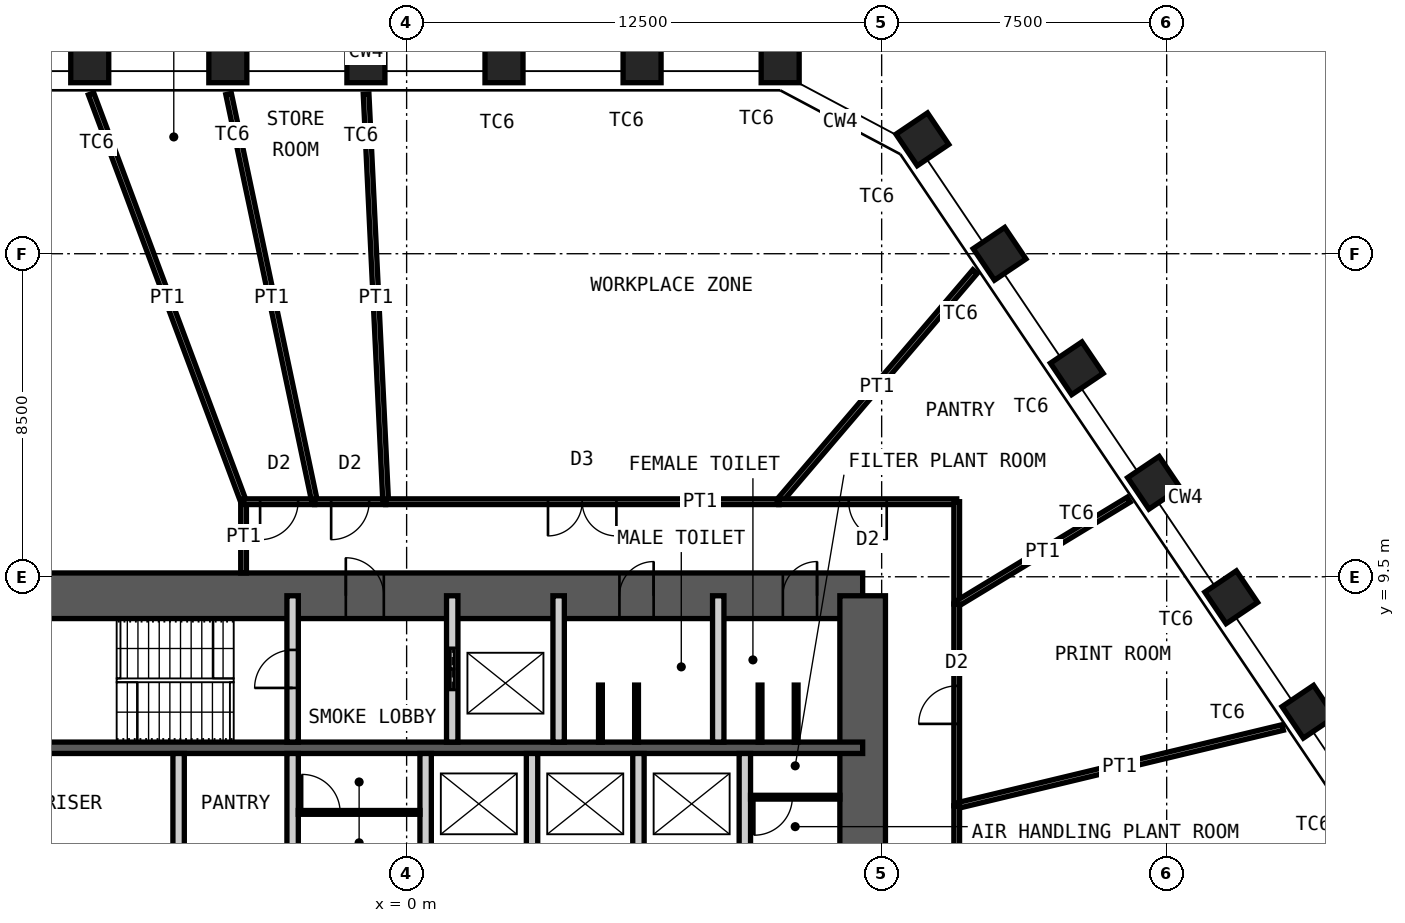
"""IFC4 building model, lengths in metres.
Left out: names, types, materials, properties, quantities, classifications, styles, units other than length and angle.
Written with IfcOpenShell. Run it as: python <this file> out.ifc"""

import sys

from ifc_helpers import new_model, si_unit, direction, frame, frame_2d, origin, origin_2d, place, context, subcontext, project, spatial, rectangle, hollow_rectangle, extrude, element, fill, save


model = new_model("IFC4")
c1 = context("Model", 3, precision=1e-05, world=origin(), true_north=direction((0.0, 1.0)))
c2 = subcontext(c1, "Body", "Model", "MODEL_VIEW")
j1 = project(units=[si_unit("LENGTHUNIT", "METRE"), si_unit("PLANEANGLEUNIT", "RADIAN")], contexts=[c1])
p1 = place(None, origin())
s1 = spatial("IfcSite", under=j1, at=p1, CompositionType="ELEMENT")
p2 = place(p1, origin())
s2 = spatial("IfcBuilding", under=s1, at=p2, CompositionType="ELEMENT")
p3 = place(p2, frame((0.0, 0.0, 235.0)))
s3 = spatial("IfcBuildingStorey", under=s2, at=p3, CompositionType="ELEMENT", Elevation=235.0)
for number, where, z_axis, x_axis in (
    (1, (-8.338, 23.0, 0.0), (0.0, 0.0, 1.0), (-1.0, 0.0, 0.0)),
    (2, (-4.705, 23.0, 0.0), (0.0, 0.0, 1.0), (-1.0, 0.0, 0.0)),
    (3, (-1.071, 23.0, 0.0), (0.0, 0.0, 1.0), (-1.0, 0.0, 0.0)),
    (4, (2.562, 23.0, 0.0), (0.0, 0.0, 1.0), (-1.0, 0.0, 0.0)),
    (5, (6.196, 23.0, 0.0), (0.0, 0.0, 1.0), (-1.0, 0.0, 0.0)),
    (6, (9.829, 23.0, 0.0), (0.0, 0.0, 1.0), (-1.0, 0.0, 0.0)),
    (7, (13.571, 21.01, 0.0), (0.0, 0.0, 1.0), (-0.559, 0.829, 0.0)),
    (8, (15.603, 17.998, 0.0), (0.0, 0.0, 1.0), (-0.559, 0.829, 0.0)),
    (9, (17.635, 14.986, 0.0), (0.0, 0.0, 1.0), (-0.559, 0.829, 0.0)),
    (10, (19.667, 11.973, 0.0), (0.0, 0.0, 1.0), (-0.559, 0.829, 0.0)),
    (11, (21.699, 8.961, 0.0), (0.0, 0.0, 1.0), (-0.559, 0.829, 0.0)),
    (12, (23.731, 5.948, 0.0), (0.0, 0.0, 1.0), (-0.559, 0.829, 0.0)),
):
    element("IfcColumn", number, at=place(p3, frame(where, z_axis=z_axis, x_axis=x_axis)), inside=s3, PredefinedType="COLUMN", context=c2, shape_type="SweptSolid", body=[
        extrude(hollow_rectangle(XDim=1.0, YDim=1.0, WallThickness=0.06, at=origin_2d()), origin(), (0.0, 0.0, 1.0), 4.2),
    ])
p4 = place(p3, frame((-12.0, 9.0, 0.0), z_axis=(0.0, 0.0, 1.0), x_axis=(1.0, 0.0, 0.0)))
e13 = element("IfcWall", 13, at=p4, inside=s3, PredefinedType="SHEAR", context=c2, shape_type="SweptSolid", body=[
    extrude(rectangle(XDim=24.0, YDim=1.2, at=frame_2d((12.0, 0.0))), origin(), (0.0, 0.0, 1.0), 4.2),
])
p5 = place(p4, frame((10.4, 0.0, 0.0)))
e14 = element("IfcOpeningElement", 14, at=p5, cuts=e13, PredefinedType="OPENING", context=c2, shape_type="SweptSolid", body=[
    extrude(rectangle(XDim=1.0, YDim=2.1, at=frame_2d((0.5, 1.05))), frame((0.0, 0.61, 0.0), z_axis=(0.0, -1.0, 0.0), x_axis=(1.0, 0.0, 0.0)), (0.0, 0.0, 1.0), 1.22),
])
p6 = place(p4, frame((17.6, 0.0, 0.0)))
e15 = element("IfcOpeningElement", 15, at=p6, cuts=e13, PredefinedType="OPENING", context=c2, shape_type="SweptSolid", body=[
    extrude(rectangle(XDim=0.9, YDim=2.1, at=frame_2d((0.45, 1.05))), frame((0.0, 0.61, 0.0), z_axis=(0.0, -1.0, 0.0), x_axis=(1.0, 0.0, 0.0)), (0.0, 0.0, 1.0), 1.22),
])
p7 = place(p4, frame((21.9, 0.0, 0.0)))
e16 = element("IfcOpeningElement", 16, at=p7, cuts=e13, PredefinedType="OPENING", context=c2, shape_type="SweptSolid", body=[
    extrude(rectangle(XDim=0.9, YDim=2.1, at=frame_2d((0.45, 1.05))), frame((0.0, 0.61, 0.0), z_axis=(0.0, -1.0, 0.0), x_axis=(1.0, 0.0, 0.0)), (0.0, 0.0, 1.0), 1.22),
])
p8 = place(p3, frame((12.0, -9.0, 0.0), z_axis=(0.0, 0.0, 1.0), x_axis=(0.0, 1.0, 0.0)))
e17 = element("IfcWall", 17, at=p8, inside=s3, PredefinedType="SHEAR", context=c2, shape_type="SweptSolid", body=[
    extrude(rectangle(XDim=18.0, YDim=1.2, at=frame_2d((9.0, 0.0))), origin(), (0.0, 0.0, 1.0), 4.2),
])
p9 = place(p8, frame((8.1, 0.0, 0.0)))
e18 = element("IfcOpeningElement", 18, at=p9, cuts=e17, PredefinedType="OPENING", context=c2, shape_type="SweptSolid", body=[
    extrude(rectangle(XDim=1.8, YDim=2.1, at=frame_2d((0.9, 1.05))), frame((0.0, 0.61, 0.0), z_axis=(0.0, -1.0, 0.0), x_axis=(1.0, 0.0, 0.0)), (0.0, 0.0, 1.0), 1.22),
])
p10 = place(p3, frame((-12.0, 5.0, 0.0), z_axis=(0.0, 0.0, 1.0), x_axis=(1.0, 0.0, 0.0)))
e19 = element("IfcWall", 19, at=p10, inside=s3, PredefinedType="SHEAR", context=c2, shape_type="SweptSolid", body=[
    extrude(rectangle(XDim=24.0, YDim=0.3, at=frame_2d((12.0, 0.0))), origin(), (0.0, 0.0, 1.0), 4.2),
])
p11 = place(p3, frame((-3.0, 5.15, 0.0), z_axis=(0.0, 0.0, 1.0), x_axis=(0.0, 1.0, 0.0)))
e20 = element("IfcWall", 20, at=p11, inside=s3, PredefinedType="PARTITIONING", context=c2, shape_type="SweptSolid", body=[
    extrude(rectangle(XDim=3.85, YDim=0.3, at=frame_2d((1.925, 0.0))), origin(), (0.0, 0.0, 1.0), 3.98),
])
p12 = place(p11, frame((1.425, 0.0, 0.0)))
e21 = element("IfcOpeningElement", 21, at=p12, cuts=e20, PredefinedType="OPENING", context=c2, shape_type="SweptSolid", body=[
    extrude(rectangle(XDim=1.0, YDim=2.1, at=frame_2d((0.5, 1.05))), frame((0.0, 0.16, 0.0), z_axis=(0.0, -1.0, 0.0), x_axis=(1.0, 0.0, 0.0)), (0.0, 0.0, 1.0), 0.32),
])
p13 = place(p3, frame((1.2, 5.15, 0.0), z_axis=(0.0, 0.0, 1.0), x_axis=(0.0, 1.0, 0.0)))
e22 = element("IfcWall", 22, at=p13, inside=s3, PredefinedType="PARTITIONING", context=c2, shape_type="SweptSolid", body=[
    extrude(rectangle(XDim=3.85, YDim=0.3, at=frame_2d((1.925, 0.0))), origin(), (0.0, 0.0, 1.0), 3.98),
])
p14 = place(p13, frame((1.375, 0.0, 0.0)))
e23 = element("IfcOpeningElement", 23, at=p14, cuts=e22, PredefinedType="OPENING", context=c2, shape_type="SweptSolid", body=[
    extrude(rectangle(XDim=1.1, YDim=2.4, at=frame_2d((0.55, 1.2))), frame((0.0, 0.16, 0.0), z_axis=(0.0, -1.0, 0.0), x_axis=(1.0, 0.0, 0.0)), (0.0, 0.0, 1.0), 0.32),
])
for number, where, z_axis, x_axis in (
    (24, (4.0, 5.15, 0.0), (0.0, 0.0, 1.0), (0.0, 1.0, 0.0)),
    (25, (8.2, 5.15, 0.0), (0.0, 0.0, 1.0), (0.0, 1.0, 0.0)),
):
    element("IfcWall", number, at=place(p3, frame(where, z_axis=z_axis, x_axis=x_axis)), inside=s3, PredefinedType="PARTITIONING", context=c2, shape_type="SweptSolid", body=[
        extrude(rectangle(XDim=3.85, YDim=0.3, at=frame_2d((1.925, 0.0))), origin(), (0.0, 0.0, 1.0), 3.98),
    ])
for number, where, z_axis, x_axis in (
    (26, (-6.0, 2.2, 0.0), (0.0, 0.0, 1.0), (0.0, 1.0, 0.0)),
    (27, (-3.0, 2.2, 0.0), (0.0, 0.0, 1.0), (0.0, 1.0, 0.0)),
    (28, (0.5, 2.2, 0.0), (0.0, 0.0, 1.0), (0.0, 1.0, 0.0)),
    (29, (3.3, 2.2, 0.0), (0.0, 0.0, 1.0), (0.0, 1.0, 0.0)),
    (30, (6.1, 2.2, 0.0), (0.0, 0.0, 1.0), (0.0, 1.0, 0.0)),
    (31, (8.9, 2.2, 0.0), (0.0, 0.0, 1.0), (0.0, 1.0, 0.0)),
):
    element("IfcWall", number, at=place(p3, frame(where, z_axis=z_axis, x_axis=x_axis)), inside=s3, PredefinedType="PARTITIONING", context=c2, shape_type="SweptSolid", body=[
        extrude(rectangle(XDim=2.65, YDim=0.3, at=frame_2d((1.325, 0.0))), origin(), (0.0, 0.0, 1.0), 3.98),
    ])
p15 = place(p3, frame((-2.85, 3.3, 0.0), z_axis=(0.0, 0.0, 1.0), x_axis=(1.0, 0.0, 0.0)))
e32 = element("IfcWall", 32, at=p15, inside=s3, PredefinedType="PARTITIONING", context=c2, shape_type="SweptSolid", body=[
    extrude(rectangle(XDim=3.2, YDim=0.1, at=frame_2d((1.6, 0.0))), origin(), (0.0, 0.0, 1.0), 3.98),
])
p16 = place(p15, frame((0.1, 0.0, 0.0)))
e33 = element("IfcOpeningElement", 33, at=p16, cuts=e32, PredefinedType="OPENING", context=c2, shape_type="SweptSolid", body=[
    extrude(rectangle(XDim=1.0, YDim=2.4, at=frame_2d((0.5, 1.2))), frame((0.0, 0.06, 0.0), z_axis=(0.0, -1.0, 0.0), x_axis=(1.0, 0.0, 0.0)), (0.0, 0.0, 1.0), 0.12),
])
p17 = place(p3, frame((9.05, 3.7, 0.0), z_axis=(0.0, 0.0, 1.0), x_axis=(1.0, 0.0, 0.0)))
e34 = element("IfcWall", 34, at=p17, inside=s3, PredefinedType="PARTITIONING", context=c2, shape_type="SweptSolid", body=[
    extrude(rectangle(XDim=2.35, YDim=0.1, at=frame_2d((1.175, 0.0))), origin(), (0.0, 0.0, 1.0), 3.98),
])
p18 = place(p17, frame((0.1, 0.0, 0.0)))
e35 = element("IfcOpeningElement", 35, at=p18, cuts=e34, PredefinedType="OPENING", context=c2, shape_type="SweptSolid", body=[
    extrude(rectangle(XDim=1.0, YDim=2.4, at=frame_2d((0.5, 1.2))), frame((0.0, 0.06, 0.0), z_axis=(0.0, -1.0, 0.0), x_axis=(1.0, 0.0, 0.0)), (0.0, 0.0, 1.0), 0.12),
])
for number, where, z_axis, x_axis in (
    (36, (5.1, 5.15, 0.0), (0.0, 0.0, 1.0), (0.0, 1.0, 0.0)),
    (37, (6.05, 5.15, 0.0), (0.0, 0.0, 1.0), (0.0, 1.0, 0.0)),
    (38, (9.3, 5.15, 0.0), (0.0, 0.0, 1.0), (0.0, 1.0, 0.0)),
    (39, (10.25, 5.15, 0.0), (0.0, 0.0, 1.0), (0.0, 1.0, 0.0)),
):
    element("IfcWall", number, at=place(p3, frame(where, z_axis=z_axis, x_axis=x_axis)), inside=s3, PredefinedType="PARTITIONING", context=c2, shape_type="SweptSolid", body=[
        extrude(rectangle(XDim=1.5, YDim=0.1, at=frame_2d((0.75, 0.0))), origin(), (0.0, 0.0, 1.0), 2.1),
    ])
p19 = place(p3, frame((-4.291, 9.6, 0.0), z_axis=(0.0, 0.0, 1.0), x_axis=(0.0, 1.0, 0.0)))
e40 = element("IfcWall", 40, at=p19, inside=s3, PredefinedType="PARTITIONING", context=c2, shape_type="SweptSolid", body=[
    extrude(rectangle(XDim=1.875, YDim=0.15, at=frame_2d((0.938, 0.0))), origin(), (0.0, 0.0, 1.0), 4.03),
])
p20 = place(p3, frame((-8.303, 22.206, 0.0), z_axis=(0.0, 0.0, 1.0), x_axis=(0.350242883069, -0.936658914899, 0.0)))
e41 = element("IfcWall", 41, at=p20, inside=s3, PredefinedType="PARTITIONING", context=c2, shape_type="SweptSolid", body=[
    extrude(rectangle(XDim=11.457, YDim=0.15, at=frame_2d((5.729, 0.0))), origin(), (0.0, 0.0, 1.0), 3.43),
])
p21 = place(p3, frame((-4.291, 11.475, 0.0), z_axis=(0.0, 0.0, 1.0), x_axis=(1.0, 0.0, 0.0)))
e42 = element("IfcWall", 42, at=p21, inside=s3, PredefinedType="PARTITIONING", context=c2, shape_type="SweptSolid", body=[
    extrude(rectangle(XDim=1.87, YDim=0.15, at=frame_2d((0.935, 0.0))), origin(), (0.0, 0.0, 1.0), 4.03),
])
p22 = place(p21, frame((0.435, 0.0, 0.0)))
e43 = element("IfcOpeningElement", 43, at=p22, cuts=e42, PredefinedType="OPENING", context=c2, shape_type="SweptSolid", body=[
    extrude(rectangle(XDim=1.0, YDim=2.4, at=frame_2d((0.5, 1.2))), frame((0.0, 0.085, 0.0), z_axis=(0.0, -1.0, 0.0), x_axis=(1.0, 0.0, 0.0)), (0.0, 0.0, 1.0), 0.17),
])
p23 = place(p3, frame((-4.684, 22.202, 0.0), z_axis=(0.0, 0.0, 1.0), x_axis=(0.206456017157, -0.978455881979, 0.0)))
e44 = element("IfcWall", 44, at=p23, inside=s3, PredefinedType="PARTITIONING", context=c2, shape_type="SweptSolid", body=[
    extrude(rectangle(XDim=10.963, YDim=0.15, at=frame_2d((5.481, 0.0))), origin(), (0.0, 0.0, 1.0), 3.43),
])
p24 = place(p3, frame((-2.421, 11.475, 0.0), z_axis=(0.0, 0.0, 1.0), x_axis=(1.0, 0.0, 0.0)))
e45 = element("IfcWall", 45, at=p24, inside=s3, PredefinedType="PARTITIONING", context=c2, shape_type="SweptSolid", body=[
    extrude(rectangle(XDim=1.87, YDim=0.15, at=frame_2d((0.935, 0.0))), origin(), (0.0, 0.0, 1.0), 4.03),
])
p25 = place(p24, frame((0.435, 0.0, 0.0)))
e46 = element("IfcOpeningElement", 46, at=p25, cuts=e45, PredefinedType="OPENING", context=c2, shape_type="SweptSolid", body=[
    extrude(rectangle(XDim=1.0, YDim=2.4, at=frame_2d((0.5, 1.2))), frame((0.0, 0.085, 0.0), z_axis=(0.0, -1.0, 0.0), x_axis=(1.0, 0.0, 0.0)), (0.0, 0.0, 1.0), 0.17),
])
p26 = place(p3, frame((-1.067, 22.2, 0.0), z_axis=(0.0, 0.0, 1.0), x_axis=(0.047998335863, -0.998847415652, 0.0)))
e47 = element("IfcWall", 47, at=p26, inside=s3, PredefinedType="PARTITIONING", context=c2, shape_type="SweptSolid", body=[
    extrude(rectangle(XDim=10.738, YDim=0.15, at=frame_2d((5.369, 0.0))), origin(), (0.0, 0.0, 1.0), 3.43),
])
p27 = place(p3, frame((-0.551, 11.475, 0.0), z_axis=(0.0, 0.0, 1.0), x_axis=(1.0, 0.0, 0.0)))
e48 = element("IfcWall", 48, at=p27, inside=s3, PredefinedType="PARTITIONING", context=c2, shape_type="SweptSolid", body=[
    extrude(rectangle(XDim=10.342, YDim=0.15, at=frame_2d((5.171, 0.0))), origin(), (0.0, 0.0, 1.0), 4.03),
])
p28 = place(p27, frame((4.271, 0.0, 0.0)))
e49 = element("IfcOpeningElement", 49, at=p28, cuts=e48, PredefinedType="OPENING", context=c2, shape_type="SweptSolid", body=[
    extrude(rectangle(XDim=1.8, YDim=2.4, at=frame_2d((0.9, 1.2))), frame((0.0, 0.085, 0.0), z_axis=(0.0, -1.0, 0.0), x_axis=(1.0, 0.0, 0.0)), (0.0, 0.0, 1.0), 0.17),
])
p29 = place(p3, frame((14.958, 17.531, 0.0), z_axis=(0.0, 0.0, 1.0), x_axis=(-0.649097500837, -0.760705221756, 0.0)))
e50 = element("IfcWall", 50, at=p29, inside=s3, PredefinedType="PARTITIONING", context=c2, shape_type="SweptSolid", body=[
    extrude(rectangle(XDim=7.96, YDim=0.15, at=frame_2d((3.98, 0.0))), origin(), (0.0, 0.0, 1.0), 3.43),
])
p30 = place(p3, frame((9.791, 11.475, 0.0), z_axis=(0.0, 0.0, 1.0), x_axis=(1.0, 0.0, 0.0)))
e51 = element("IfcWall", 51, at=p30, inside=s3, PredefinedType="PARTITIONING", context=c2, shape_type="SweptSolid", body=[
    extrude(rectangle(XDim=4.684, YDim=0.15, at=frame_2d((2.342, 0.0))), origin(), (0.0, 0.0, 1.0), 4.03),
])
p31 = place(p30, frame((1.842, 0.0, 0.0)))
e52 = element("IfcOpeningElement", 52, at=p31, cuts=e51, PredefinedType="OPENING", context=c2, shape_type="SweptSolid", body=[
    extrude(rectangle(XDim=1.0, YDim=2.4, at=frame_2d((0.5, 1.2))), frame((0.0, 0.085, 0.0), z_axis=(0.0, -1.0, 0.0), x_axis=(1.0, 0.0, 0.0)), (0.0, 0.0, 1.0), 0.17),
])
p32 = place(p3, frame((14.475, 11.475, 0.0), z_axis=(0.0, 0.0, 1.0), x_axis=(0.0, -1.0, 0.0)))
e53 = element("IfcWall", 53, at=p32, inside=s3, PredefinedType="PARTITIONING", context=c2, shape_type="SweptSolid", body=[
    extrude(rectangle(XDim=2.692, YDim=0.15, at=frame_2d((1.346, 0.0))), origin(), (0.0, 0.0, 1.0), 4.03),
])
p33 = place(p3, frame((19.001, 11.53, 0.0), z_axis=(0.0, 0.0, 1.0), x_axis=(-0.854906581035, -0.518781975114, 0.0)))
e54 = element("IfcWall", 54, at=p33, inside=s3, PredefinedType="PARTITIONING", context=c2, shape_type="SweptSolid", body=[
    extrude(rectangle(XDim=5.294, YDim=0.15, at=frame_2d((2.647, 0.0))), origin(), (0.0, 0.0, 1.0), 3.43),
])
p34 = place(p3, frame((14.475, 8.783, 0.0), z_axis=(0.0, 0.0, 1.0), x_axis=(0.0, -1.0, 0.0)))
e55 = element("IfcWall", 55, at=p34, inside=s3, PredefinedType="PARTITIONING", context=c2, shape_type="SweptSolid", body=[
    extrude(rectangle(XDim=5.309, YDim=0.15, at=frame_2d((2.654, 0.0))), origin(), (0.0, 0.0, 1.0), 4.03),
])
p35 = place(p34, frame((2.154, 0.0, 0.0)))
e56 = element("IfcOpeningElement", 56, at=p35, cuts=e55, PredefinedType="OPENING", context=c2, shape_type="SweptSolid", body=[
    extrude(rectangle(XDim=1.0, YDim=2.4, at=frame_2d((0.5, 1.2))), frame((0.0, 0.085, 0.0), z_axis=(0.0, -1.0, 0.0), x_axis=(1.0, 0.0, 0.0)), (0.0, 0.0, 1.0), 0.17),
])
p36 = place(p3, frame((23.053, 5.534, 0.0), z_axis=(0.0, 0.0, 1.0), x_axis=(-0.972377252501, -0.233414821335, 0.0)))
e57 = element("IfcWall", 57, at=p36, inside=s3, PredefinedType="PARTITIONING", context=c2, shape_type="SweptSolid", body=[
    extrude(rectangle(XDim=8.822, YDim=0.15, at=frame_2d((4.411, 0.0))), origin(), (0.0, 0.0, 1.0), 3.43),
])
p37 = place(p3, frame((14.475, 3.475, 0.0), z_axis=(0.0, 0.0, 1.0), x_axis=(0.0, -1.0, 0.0)))
e58 = element("IfcWall", 58, at=p37, inside=s3, PredefinedType="PARTITIONING", context=c2, shape_type="SweptSolid", body=[
    extrude(rectangle(XDim=5.896, YDim=0.15, at=frame_2d((2.948, 0.0))), origin(), (0.0, 0.0, 1.0), 4.03),
])
p38 = place(p37, frame((2.448, 0.0, 0.0)))
e59 = element("IfcOpeningElement", 59, at=p38, cuts=e58, PredefinedType="OPENING", context=c2, shape_type="SweptSolid", body=[
    extrude(rectangle(XDim=1.0, YDim=2.4, at=frame_2d((0.5, 1.2))), frame((0.0, 0.085, 0.0), z_axis=(0.0, -1.0, 0.0), x_axis=(1.0, 0.0, 0.0)), (0.0, 0.0, 1.0), 0.17),
])
p39 = place(p5, origin())
e60 = element("IfcDoor", 60, at=p39, inside=s3, OperationType="SINGLE_SWING_RIGHT", PredefinedType="DOOR", context=c2, shape_type="SweptSolid", body=[
    extrude(rectangle(XDim=1.0, YDim=2.1, at=frame_2d((0.5, 1.05))), frame((0.0, 0.025, 0.0), z_axis=(0.0, -1.0, 0.0), x_axis=(1.0, 0.0, 0.0)), (0.0, 0.0, 1.0), 0.05),
])
fill(e14, e60)
p40 = place(p6, origin())
e61 = element("IfcDoor", 61, at=p40, inside=s3, OperationType="SINGLE_SWING_LEFT", PredefinedType="DOOR", context=c2, shape_type="SweptSolid", body=[
    extrude(rectangle(XDim=0.9, YDim=2.1, at=frame_2d((0.45, 1.05))), frame((0.0, 0.025, 0.0), z_axis=(0.0, -1.0, 0.0), x_axis=(1.0, 0.0, 0.0)), (0.0, 0.0, 1.0), 0.05),
])
fill(e15, e61)
p41 = place(p7, origin())
e62 = element("IfcDoor", 62, at=p41, inside=s3, OperationType="SINGLE_SWING_LEFT", PredefinedType="DOOR", context=c2, shape_type="SweptSolid", body=[
    extrude(rectangle(XDim=0.9, YDim=2.1, at=frame_2d((0.45, 1.05))), frame((0.0, 0.025, 0.0), z_axis=(0.0, -1.0, 0.0), x_axis=(1.0, 0.0, 0.0)), (0.0, 0.0, 1.0), 0.05),
])
fill(e16, e62)
p42 = place(p12, origin())
e63 = element("IfcDoor", 63, at=p42, inside=s3, OperationType="SINGLE_SWING_RIGHT", PredefinedType="DOOR", context=c2, shape_type="SweptSolid", body=[
    extrude(rectangle(XDim=1.0, YDim=2.1, at=frame_2d((0.5, 1.05))), frame((0.0, 0.025, 0.0), z_axis=(0.0, -1.0, 0.0), x_axis=(1.0, 0.0, 0.0)), (0.0, 0.0, 1.0), 0.05),
])
fill(e21, e63)
p43 = place(p14, origin())
e64 = element("IfcDoor", 64, at=p43, inside=s3, OperationType="DOUBLE_DOOR_SLIDING", PredefinedType="DOOR", context=c2, shape_type="SweptSolid", body=[
    extrude(rectangle(XDim=1.1, YDim=2.4, at=frame_2d((0.55, 1.2))), frame((0.0, 0.025, 0.0), z_axis=(0.0, -1.0, 0.0), x_axis=(1.0, 0.0, 0.0)), (0.0, 0.0, 1.0), 0.05),
])
fill(e23, e64)
p44 = place(p16, origin())
e65 = element("IfcDoor", 65, at=p44, inside=s3, OperationType="SINGLE_SWING_RIGHT", PredefinedType="DOOR", context=c2, shape_type="SweptSolid", body=[
    extrude(rectangle(XDim=1.0, YDim=2.4, at=frame_2d((0.5, 1.2))), frame((0.0, 0.025, 0.0), z_axis=(0.0, -1.0, 0.0), x_axis=(1.0, 0.0, 0.0)), (0.0, 0.0, 1.0), 0.05),
])
fill(e33, e65)
p45 = place(p18, origin())
e66 = element("IfcDoor", 66, at=p45, inside=s3, OperationType="SINGLE_SWING_LEFT", PredefinedType="DOOR", context=c2, shape_type="SweptSolid", body=[
    extrude(rectangle(XDim=1.0, YDim=2.4, at=frame_2d((0.5, 1.2))), frame((0.0, 0.025, 0.0), z_axis=(0.0, -1.0, 0.0), x_axis=(1.0, 0.0, 0.0)), (0.0, 0.0, 1.0), 0.05),
])
fill(e35, e66)
p46 = place(p22, origin())
e67 = element("IfcDoor", 67, at=p46, inside=s3, OperationType="SINGLE_SWING_LEFT", PredefinedType="DOOR", context=c2, shape_type="SweptSolid", body=[
    extrude(rectangle(XDim=1.0, YDim=2.4, at=frame_2d((0.5, 1.2))), frame((0.0, 0.025, 0.0), z_axis=(0.0, -1.0, 0.0), x_axis=(1.0, 0.0, 0.0)), (0.0, 0.0, 1.0), 0.05),
])
fill(e43, e67)
p47 = place(p25, origin())
e68 = element("IfcDoor", 68, at=p47, inside=s3, OperationType="SINGLE_SWING_LEFT", PredefinedType="DOOR", context=c2, shape_type="SweptSolid", body=[
    extrude(rectangle(XDim=1.0, YDim=2.4, at=frame_2d((0.5, 1.2))), frame((0.0, 0.025, 0.0), z_axis=(0.0, -1.0, 0.0), x_axis=(1.0, 0.0, 0.0)), (0.0, 0.0, 1.0), 0.05),
])
fill(e46, e68)
p48 = place(p28, origin())
e69 = element("IfcDoor", 69, at=p48, inside=s3, OperationType="DOUBLE_DOOR_DOUBLE_SWING", PredefinedType="DOOR", context=c2, shape_type="SweptSolid", body=[
    extrude(rectangle(XDim=1.8, YDim=2.4, at=frame_2d((0.9, 1.2))), frame((0.0, 0.025, 0.0), z_axis=(0.0, -1.0, 0.0), x_axis=(1.0, 0.0, 0.0)), (0.0, 0.0, 1.0), 0.05),
])
fill(e49, e69)
p49 = place(p31, origin())
e70 = element("IfcDoor", 70, at=p49, inside=s3, OperationType="SINGLE_SWING_RIGHT", PredefinedType="DOOR", context=c2, shape_type="SweptSolid", body=[
    extrude(rectangle(XDim=1.0, YDim=2.4, at=frame_2d((0.5, 1.2))), frame((0.0, 0.025, 0.0), z_axis=(0.0, -1.0, 0.0), x_axis=(1.0, 0.0, 0.0)), (0.0, 0.0, 1.0), 0.05),
])
fill(e52, e70)
p50 = place(p35, origin())
e71 = element("IfcDoor", 71, at=p50, inside=s3, OperationType="SINGLE_SWING_RIGHT", PredefinedType="DOOR", context=c2, shape_type="SweptSolid", body=[
    extrude(rectangle(XDim=1.0, YDim=2.4, at=frame_2d((0.5, 1.2))), frame((0.0, 0.025, 0.0), z_axis=(0.0, -1.0, 0.0), x_axis=(1.0, 0.0, 0.0)), (0.0, 0.0, 1.0), 0.05),
])
fill(e56, e71)
save(model, sys.argv[1])
